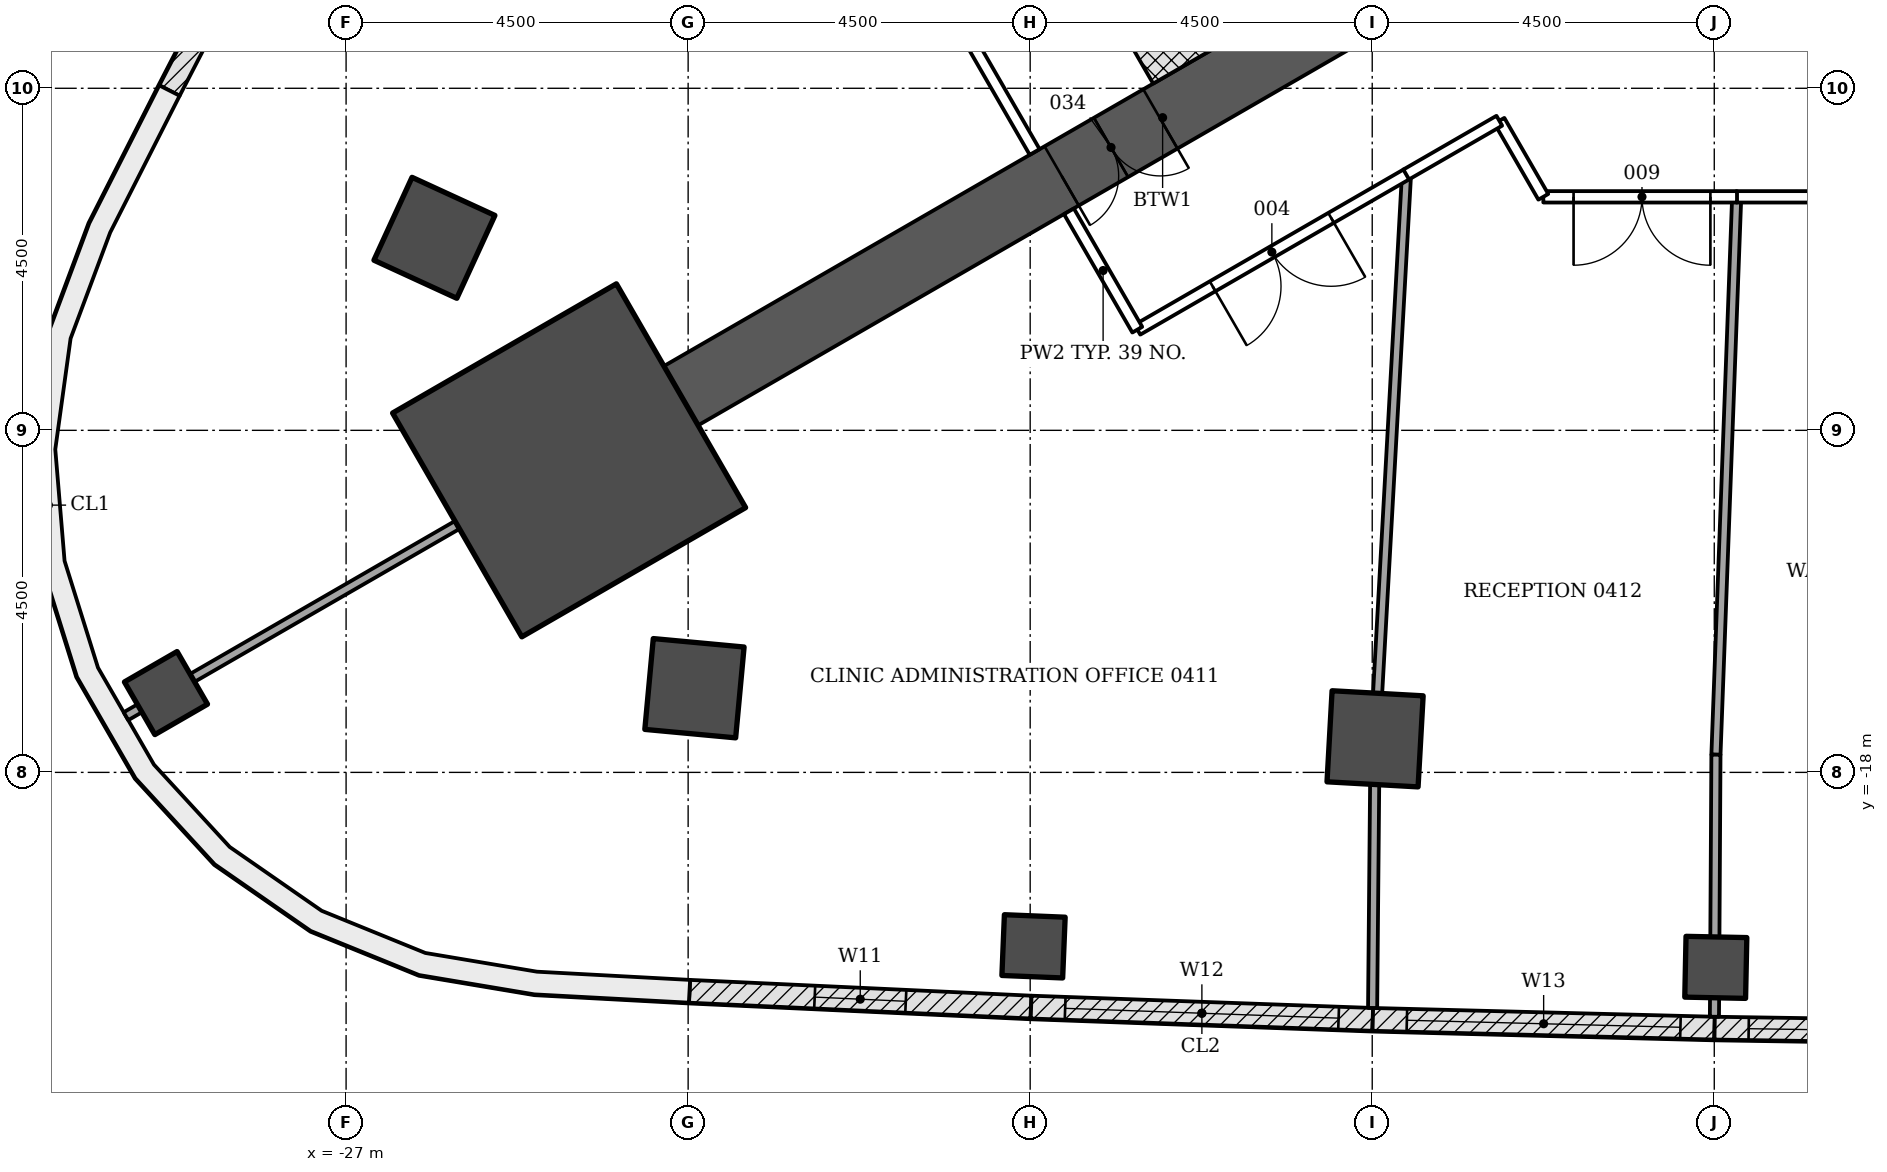
"""IFC4 building model, lengths in metres.
Left out: names, types, materials, properties, quantities, classifications, styles, units other than length and angle.
Written with IfcOpenShell. Run it as: python <this file> out.ifc"""

import sys

from ifc_helpers import new_model, si_unit, direction, frame, frame_2d, origin, origin_2d, place, context, subcontext, project, spatial, polyline, rectangle, outline, extrude, element, fill, save


model = new_model("IFC4")
c1 = context("Model", 3, precision=1e-05, world=origin(), true_north=direction((0.0, 1.0)))
c2 = subcontext(c1, "Body", "Model", "MODEL_VIEW")
j1 = project(units=[si_unit("LENGTHUNIT", "METRE"), si_unit("PLANEANGLEUNIT", "RADIAN")], contexts=[c1])
p1 = place(None, origin())
s1 = spatial("IfcSite", under=j1, at=p1, CompositionType="ELEMENT")
p2 = place(p1, origin())
s2 = spatial("IfcBuilding", under=s1, at=p2, CompositionType="ELEMENT")
p3 = place(p2, frame((0.0, 0.0, 19.5)))
s3 = spatial("IfcBuildingStorey", under=s2, at=p3, CompositionType="ELEMENT", Elevation=19.5)
for number, where, z_axis, x_axis in (
    (1, (-25.838, -10.967, -0.25), (0.0, 0.0, 1.0), (-0.909, 0.418, 0.0)),
    (2, (-22.417, -16.893, -0.25), (0.0, 0.0, 1.0), (-0.093, -0.996, 0.0)),
    (3, (-13.462, -17.558, -0.25), (0.0, 0.0, 1.0), (-0.056, -0.998, 0.0)),
):
    element("IfcColumn", number, at=place(p3, frame(where, z_axis=z_axis, x_axis=x_axis)), inside=s3, PredefinedType="COLUMN", context=c2, shape_type="SweptSolid", body=[
        extrude(rectangle(XDim=1.2, YDim=1.2, at=origin_2d()), origin(), (0.0, 0.0, 1.0), 4.55),
    ])
for number, where, z_axis, x_axis in (
    (4, (-29.37, -16.957, -0.25), (0.0, 0.0, 1.0), (-0.866, -0.5, 0.0)),
    (5, (-17.956, -20.288, -0.25), (0.0, 0.0, 1.0), (-0.041, -0.999, 0.0)),
    (6, (-8.98, -20.565, -0.25), (0.0, 0.0, 1.0), (-0.021, -1.0, 0.0)),
):
    element("IfcColumn", number, at=place(p3, frame(where, z_axis=z_axis, x_axis=x_axis)), inside=s3, PredefinedType="COLUMN", context=c2, shape_type="SweptSolid", body=[
        extrude(rectangle(XDim=0.8, YDim=0.8, at=origin_2d()), origin(), (0.0, 0.0, 1.0), 4.55),
    ])
p4 = place(p3, frame((-9.922, -5.728, -0.25), z_axis=(0.0, 0.0, 1.0), x_axis=(-0.866028046028, -0.499995423472, 0.0)))
e7 = element("IfcWall", 7, at=p4, inside=s3, PredefinedType="SHEAR", context=c2, shape_type="SweptSolid", body=[
    extrude(rectangle(XDim=14.633, YDim=0.9, at=frame_2d((7.316, 0.0))), origin(), (0.0, 0.0, 1.0), 4.55),
])
p5 = place(p4, frame((7.35, 0.0, 0.25)))
e8 = element("IfcOpeningElement", 8, at=p5, cuts=e7, PredefinedType="OPENING", context=c2, shape_type="SweptSolid", body=[
    extrude(rectangle(XDim=1.5, YDim=2.1, at=frame_2d((0.75, 1.05))), frame((0.0, 0.46, 0.0), z_axis=(0.0, -1.0, 0.0), x_axis=(1.0, 0.0, 0.0)), (0.0, 0.0, 1.0), 0.92),
])
p6 = place(p3, frame((-24.066, -13.895, -0.25), z_axis=(0.0, 0.0, 1.0), x_axis=(-0.866025403784, -0.5, 0.0)))
e9 = element("IfcColumn", 9, at=p6, inside=s3, PredefinedType="COLUMN", context=c2, shape_type="SweptSolid", body=[
    extrude(rectangle(XDim=3.4, YDim=3.4, at=origin_2d()), origin(), (0.0, 0.0, 1.0), 4.55),
])
p7 = place(p3, frame((-29.323, -9.029, 0.0), z_axis=(0.0, 0.0, 1.0), x_axis=(0.459443600121, 0.888206945654, 0.0)))
e10 = element("IfcWall", 10, at=p7, inside=s3, PredefinedType="NOTDEFINED", context=c2, shape_type="SweptSolid", body=[
    extrude(rectangle(XDim=4.496, YDim=0.3, at=frame_2d((2.248, 0.0))), origin(), (0.0, 0.0, 1.0), 4.3),
])
p8 = place(p7, frame((1.648, 0.0, 0.8)))
e11 = element("IfcOpeningElement", 11, at=p8, cuts=e10, PredefinedType="OPENING", context=c2, shape_type="SweptSolid", body=[
    extrude(rectangle(XDim=1.2, YDim=3.0, at=frame_2d((0.6, 1.5))), frame((0.0, 0.16, 0.0), z_axis=(0.0, -1.0, 0.0), x_axis=(1.0, 0.0, 0.0)), (0.0, 0.0, 1.0), 0.32),
])
p9 = place(p3, frame((-17.99, -21.088, 0.0), z_axis=(0.0, 0.0, 1.0), x_axis=(-0.998931717866, 0.046210637742, 0.0)))
e12 = element("IfcWall", 12, at=p9, inside=s3, PredefinedType="NOTDEFINED", context=c2, shape_type="SweptSolid", body=[
    extrude(rectangle(XDim=4.496, YDim=0.3, at=frame_2d((2.248, 0.0))), origin(), (0.0, 0.0, 1.0), 4.3),
])
p10 = place(p9, frame((1.648, 0.0, 0.8)))
e13 = element("IfcOpeningElement", 13, at=p10, cuts=e12, PredefinedType="OPENING", context=c2, shape_type="SweptSolid", body=[
    extrude(rectangle(XDim=1.2, YDim=3.0, at=frame_2d((0.6, 1.5))), frame((0.0, 0.16, 0.0), z_axis=(0.0, -1.0, 0.0), x_axis=(1.0, 0.0, 0.0)), (0.0, 0.0, 1.0), 0.32),
])
p11 = place(p3, frame((-13.494, -21.249, 0.0), z_axis=(0.0, 0.0, 1.0), x_axis=(-0.999355640029, 0.035892962294, 0.0)))
e14 = element("IfcWall", 14, at=p11, inside=s3, PredefinedType="NOTDEFINED", context=c2, shape_type="SweptSolid", body=[
    extrude(rectangle(XDim=4.496, YDim=0.3, at=frame_2d((2.248, 0.0))), origin(), (0.0, 0.0, 1.0), 4.3),
])
p12 = place(p11, frame((0.448, 0.0, 1.5)))
e15 = element("IfcOpeningElement", 15, at=p12, cuts=e14, PredefinedType="OPENING", context=c2, shape_type="SweptSolid", body=[
    extrude(rectangle(XDim=3.6, YDim=1.8, at=frame_2d((1.8, 0.9))), frame((0.0, 0.16, 0.0), z_axis=(0.0, -1.0, 0.0), x_axis=(1.0, 0.0, 0.0)), (0.0, 0.0, 1.0), 0.32),
])
p13 = place(p3, frame((-8.998, -21.365, 0.0), z_axis=(0.0, 0.0, 1.0), x_axis=(-0.999671466587, 0.025631209312, 0.0)))
e16 = element("IfcWall", 16, at=p13, inside=s3, PredefinedType="NOTDEFINED", context=c2, shape_type="SweptSolid", body=[
    extrude(rectangle(XDim=4.496, YDim=0.3, at=frame_2d((2.248, 0.0))), origin(), (0.0, 0.0, 1.0), 4.3),
])
p14 = place(p13, frame((0.448, 0.0, 1.5)))
e17 = element("IfcOpeningElement", 17, at=p14, cuts=e16, PredefinedType="OPENING", context=c2, shape_type="SweptSolid", body=[
    extrude(rectangle(XDim=3.6, YDim=1.8, at=frame_2d((1.8, 0.9))), frame((0.0, 0.16, 0.0), z_axis=(0.0, -1.0, 0.0), x_axis=(1.0, 0.0, 0.0)), (0.0, 0.0, 1.0), 0.32),
])
p15 = place(p3, frame((-4.5, -21.434, 0.0), z_axis=(0.0, 0.0, 1.0), x_axis=(-0.999881921814, 0.015366926462, 0.0)))
e18 = element("IfcWall", 18, at=p15, inside=s3, PredefinedType="NOTDEFINED", context=c2, shape_type="SweptSolid", body=[
    extrude(rectangle(XDim=4.496, YDim=0.3, at=frame_2d((2.248, 0.0))), origin(), (0.0, 0.0, 1.0), 4.3),
])
p16 = place(p15, frame((0.448, 0.0, 1.5)))
e19 = element("IfcOpeningElement", 19, at=p16, cuts=e18, PredefinedType="OPENING", context=c2, shape_type="SweptSolid", body=[
    extrude(rectangle(XDim=3.6, YDim=1.8, at=frame_2d((1.8, 0.9))), frame((0.0, 0.16, 0.0), z_axis=(0.0, -1.0, 0.0), x_axis=(1.0, 0.0, 0.0)), (0.0, 0.0, 1.0), 0.32),
])
p17 = place(p3, origin())
e20 = element("IfcWall", 20, at=p17, inside=s3, PredefinedType="NOTDEFINED", context=c2, shape_type="SweptSolid", body=[
    extrude(outline(polyline([(-29.457, -8.962), (-30.379, -10.776), (-30.917, -12.218), (-31.128, -13.742), (-31.0, -15.276), (-30.54, -16.744), (-29.771, -18.077), (-28.729, -19.209), (-27.465, -20.086), (-26.04, -20.666), (-24.522, -20.921), (-22.49, -21.03), (-22.474, -20.73), (-24.489, -20.622), (-25.957, -20.376), (-27.321, -19.821), (-28.531, -18.981), (-29.528, -17.898), (-30.264, -16.623), (-30.704, -15.218), (-30.826, -13.75), (-30.625, -12.292), (-30.104, -10.897), (-29.19, -9.098), (-29.457, -8.962)])), origin(), (0.0, 0.0, 1.0), 4.3),
])
p18 = place(p3, frame((-10.43, -4.847, -0.25), z_axis=(0.0, 0.0, 1.0), x_axis=(-0.866018442252, -0.500012057535, 0.0)))
e21 = element("IfcWall", 21, at=p18, inside=s3, PredefinedType="SHEAR", context=c2, shape_type="SweptSolid", body=[
    extrude(rectangle(XDim=7.2, YDim=1.136, at=frame_2d((3.6, 0.0))), origin(), (0.0, 0.0, 1.0), 4.55),
])
p19 = place(p3, frame((-13.495, -21.099, 0.0), z_axis=(0.0, 0.0, 1.0), x_axis=(0.009216581037, 0.999957526415, 0.0)))
e22 = element("IfcWall", 22, at=p19, inside=s3, PredefinedType="PARTITIONING", context=c2, shape_type="SweptSolid", body=[
    extrude(rectangle(XDim=2.94, YDim=0.12, at=frame_2d((1.47, 0.0))), origin(), (0.0, 0.0, 1.0), 3.683),
])
p20 = place(p3, frame((-13.429, -16.96, 0.0), z_axis=(0.0, 0.0, 1.0), x_axis=(0.055551088657, 0.998455846069, 0.0)))
e23 = element("IfcWall", 23, at=p20, inside=s3, PredefinedType="PARTITIONING", context=c2, shape_type="SweptSolid", body=[
    extrude(rectangle(XDim=6.838, YDim=0.12, at=frame_2d((3.419, 0.0))), origin(), (0.0, 0.0, 1.0), 3.767),
])
p21 = place(p3, frame((-13.045, -10.13, 0.0), z_axis=(0.0, 0.0, 1.0), x_axis=(-0.866035577775, -0.499982377718, 0.0)))
e24 = element("IfcWall", 24, at=p21, inside=s3, PredefinedType="PARTITIONING", context=c2, shape_type="SweptSolid", body=[
    extrude(rectangle(XDim=4.093, YDim=0.15, at=frame_2d((2.046, 0.0))), origin(), (0.0, 0.0, 1.0), 3.767),
])
p22 = place(p21, frame((1.15, 0.0, 0.0)))
e25 = element("IfcOpeningElement", 25, at=p22, cuts=e24, PredefinedType="OPENING", context=c2, shape_type="SweptSolid", body=[
    extrude(rectangle(XDim=1.8, YDim=2.1, at=frame_2d((0.9, 1.05))), frame((0.0, 0.085, 0.0), z_axis=(0.0, -1.0, 0.0), x_axis=(1.0, 0.0, 0.0)), (0.0, 0.0, 1.0), 0.17),
])
p23 = place(p3, frame((-16.591, -12.176, 0.0), z_axis=(0.0, 0.0, 1.0), x_axis=(-0.499965372359, 0.866045395139, 0.0)))
e26 = element("IfcWall", 26, at=p23, inside=s3, PredefinedType="PARTITIONING", context=c2, shape_type="SweptSolid", body=[
    extrude(rectangle(XDim=1.798, YDim=0.15, at=frame_2d((0.899, 0.0))), origin(), (0.0, 0.0, 1.0), 3.843),
])
p24 = place(p3, frame((-29.716, -17.157, 0.0), z_axis=(0.0, 0.0, 1.0), x_axis=(-0.865774595023, -0.500434162116, 0.0)))
e27 = element("IfcWall", 27, at=p24, inside=s3, PredefinedType="PARTITIONING", context=c2, shape_type="SweptSolid", body=[
    extrude(rectangle(XDim=0.208, YDim=0.12, at=frame_2d((0.104, 0.0))), origin(), (0.0, 0.0, 1.0), 4.3),
])
p25 = place(p3, frame((-25.538, -14.745, 0.0), z_axis=(0.0, 0.0, 1.0), x_axis=(-0.866027971625, -0.499995552344, 0.0)))
e28 = element("IfcWall", 28, at=p25, inside=s3, PredefinedType="PARTITIONING", context=c2, shape_type="SweptSolid", body=[
    extrude(rectangle(XDim=4.024, YDim=0.12, at=frame_2d((2.012, 0.0))), origin(), (0.0, 0.0, 1.0), 3.767),
])
p26 = place(p3, frame((-8.996, -20.965, 0.0), z_axis=(0.0, 0.0, 1.0), x_axis=(-0.007812261592, -0.999969483819, 0.0)))
e29 = element("IfcWall", 29, at=p26, inside=s3, PredefinedType="PARTITIONING", context=c2, shape_type="SweptSolid", body=[
    extrude(rectangle(XDim=0.25, YDim=0.12, at=frame_2d((0.125, 0.0))), origin(), (0.0, 0.0, 1.0), 4.3),
])
p27 = place(p3, frame((-8.705, -10.429, 0.0), z_axis=(0.0, 0.0, 1.0), x_axis=(-0.037170289837, -0.999308945999, 0.0)))
e30 = element("IfcWall", 30, at=p27, inside=s3, PredefinedType="PARTITIONING", context=c2, shape_type="SweptSolid", body=[
    extrude(rectangle(XDim=7.343, YDim=0.12, at=frame_2d((3.672, 0.0))), origin(), (0.0, 0.0, 1.0), 3.18),
])
p28 = place(p3, frame((-8.978, -17.767, 0.0), z_axis=(0.0, 0.0, 1.0), x_axis=(-0.005803200997, -0.999983161287, 0.0)))
e31 = element("IfcWall", 31, at=p28, inside=s3, PredefinedType="PARTITIONING", context=c2, shape_type="SweptSolid", body=[
    extrude(rectangle(XDim=2.398, YDim=0.12, at=frame_2d((1.199, 0.0))), origin(), (0.0, 0.0, 1.0), 3.18),
])
p29 = place(p3, frame((-4.347, -10.428, 0.0), z_axis=(0.0, 0.0, 1.0), x_axis=(-1.0, 0.0, 0.0)))
e32 = element("IfcWall", 32, at=p29, inside=s3, PredefinedType="PARTITIONING", context=c2, shape_type="SweptSolid", body=[
    extrude(rectangle(XDim=4.362, YDim=0.15, at=frame_2d((2.181, 0.0))), origin(), (0.0, 0.0, 1.0), 3.698),
])
p30 = place(p29, frame((1.25, 0.0, 0.0)))
e33 = element("IfcOpeningElement", 33, at=p30, cuts=e32, PredefinedType="OPENING", context=c2, shape_type="SweptSolid", body=[
    extrude(rectangle(XDim=1.8, YDim=2.1, at=frame_2d((0.9, 1.05))), frame((0.0, 0.085, 0.0), z_axis=(0.0, -1.0, 0.0), x_axis=(1.0, 0.0, 0.0)), (0.0, 0.0, 1.0), 0.17),
])
p31 = place(p3, frame((-8.701, -10.428, 0.0), z_axis=(0.0, 0.0, 1.0), x_axis=(-1.0, 0.0, 0.0)))
e34 = element("IfcWall", 34, at=p31, inside=s3, PredefinedType="PARTITIONING", context=c2, shape_type="SweptSolid", body=[
    extrude(rectangle(XDim=2.548, YDim=0.15, at=frame_2d((1.274, 0.0))), origin(), (0.0, 0.0, 1.0), 3.698),
])
p32 = place(p31, frame((0.35, 0.0, 0.0)))
e35 = element("IfcOpeningElement", 35, at=p32, cuts=e34, PredefinedType="OPENING", context=c2, shape_type="SweptSolid", body=[
    extrude(rectangle(XDim=1.8, YDim=2.1, at=frame_2d((0.9, 1.05))), frame((0.0, 0.085, 0.0), z_axis=(0.0, -1.0, 0.0), x_axis=(1.0, 0.0, 0.0)), (0.0, 0.0, 1.0), 0.17),
])
p33 = place(p3, frame((-11.249, -10.428, 0.0), z_axis=(0.0, 0.0, 1.0), x_axis=(-0.499978438088, 0.866037852202, 0.0)))
e36 = element("IfcWall", 36, at=p33, inside=s3, PredefinedType="PARTITIONING", context=c2, shape_type="SweptSolid", body=[
    extrude(rectangle(XDim=1.156, YDim=0.15, at=frame_2d((0.578, 0.0))), origin(), (0.0, 0.0, 1.0), 4.3),
])
p34 = place(p3, frame((-11.828, -9.427, 0.0), z_axis=(0.0, 0.0, 1.0), x_axis=(-0.866110865696, -0.499851946404, 0.0)))
e37 = element("IfcWall", 37, at=p34, inside=s3, PredefinedType="PARTITIONING", context=c2, shape_type="SweptSolid", body=[
    extrude(rectangle(XDim=1.415, YDim=0.15, at=frame_2d((0.707, 0.0))), origin(), (0.0, 0.0, 1.0), 3.767),
])
p35 = place(p3, frame((-17.941, -9.838, 0.0), z_axis=(0.0, 0.0, 1.0), x_axis=(-0.500048140185, 0.865997608252, 0.0)))
e38 = element("IfcWall", 38, at=p35, inside=s3, PredefinedType="PARTITIONING", context=c2, shape_type="SweptSolid", body=[
    extrude(rectangle(XDim=6.683, YDim=0.15, at=frame_2d((3.342, 0.0))), origin(), (0.0, 0.0, 1.0), 3.843),
])
p36 = place(p35, frame((2.45, 0.0, 0.0)))
e39 = element("IfcOpeningElement", 39, at=p36, cuts=e38, PredefinedType="OPENING", context=c2, shape_type="SweptSolid", body=[
    extrude(rectangle(XDim=1.8, YDim=2.1, at=frame_2d((0.9, 1.05))), frame((0.0, 0.085, 0.0), z_axis=(0.0, -1.0, 0.0), x_axis=(1.0, 0.0, 0.0)), (0.0, 0.0, 1.0), 0.17),
])
p37 = place(p10, origin())
e40 = element("IfcWindow", 40, at=p37, inside=s3, PartitioningType="SINGLE_PANEL", PredefinedType="WINDOW", context=c2, shape_type="SweptSolid", body=[
    extrude(rectangle(XDim=1.2, YDim=3.0, at=frame_2d((0.6, 1.5))), frame((0.0, 0.03, 0.0), z_axis=(0.0, -1.0, 0.0), x_axis=(1.0, 0.0, 0.0)), (0.0, 0.0, 1.0), 0.06),
])
fill(e13, e40)
p38 = place(p12, origin())
e41 = element("IfcWindow", 41, at=p38, inside=s3, PartitioningType="SINGLE_PANEL", PredefinedType="WINDOW", context=c2, shape_type="SweptSolid", body=[
    extrude(rectangle(XDim=3.6, YDim=1.8, at=frame_2d((1.8, 0.9))), frame((0.0, 0.03, 0.0), z_axis=(0.0, -1.0, 0.0), x_axis=(1.0, 0.0, 0.0)), (0.0, 0.0, 1.0), 0.06),
])
fill(e15, e41)
p39 = place(p14, origin())
e42 = element("IfcWindow", 42, at=p39, inside=s3, PartitioningType="SINGLE_PANEL", PredefinedType="WINDOW", context=c2, shape_type="SweptSolid", body=[
    extrude(rectangle(XDim=3.6, YDim=1.8, at=frame_2d((1.8, 0.9))), frame((0.0, 0.03, 0.0), z_axis=(0.0, -1.0, 0.0), x_axis=(1.0, 0.0, 0.0)), (0.0, 0.0, 1.0), 0.06),
])
fill(e17, e42)
p40 = place(p16, origin())
e43 = element("IfcWindow", 43, at=p40, inside=s3, PartitioningType="SINGLE_PANEL", PredefinedType="WINDOW", context=c2, shape_type="SweptSolid", body=[
    extrude(rectangle(XDim=3.6, YDim=1.8, at=frame_2d((1.8, 0.9))), frame((0.0, 0.03, 0.0), z_axis=(0.0, -1.0, 0.0), x_axis=(1.0, 0.0, 0.0)), (0.0, 0.0, 1.0), 0.06),
])
fill(e19, e43)
p41 = place(p22, origin())
e44 = element("IfcDoor", 44, at=p41, inside=s3, OperationType="DOUBLE_DOOR_SINGLE_SWING", PredefinedType="DOOR", context=c2, shape_type="SweptSolid", body=[
    extrude(rectangle(XDim=1.8, YDim=2.1, at=frame_2d((0.9, 1.05))), frame((0.0, 0.025, 0.0), z_axis=(0.0, -1.0, 0.0), x_axis=(1.0, 0.0, 0.0)), (0.0, 0.0, 1.0), 0.05),
])
fill(e25, e44)
p42 = place(p32, origin())
e45 = element("IfcDoor", 45, at=p42, inside=s3, OperationType="DOUBLE_DOOR_SINGLE_SWING", PredefinedType="DOOR", context=c2, shape_type="SweptSolid", body=[
    extrude(rectangle(XDim=1.8, YDim=2.1, at=frame_2d((0.9, 1.05))), frame((0.0, 0.025, 0.0), z_axis=(0.0, -1.0, 0.0), x_axis=(1.0, 0.0, 0.0)), (0.0, 0.0, 1.0), 0.05),
])
fill(e35, e45)
p43 = place(p5, origin())
e46 = element("IfcDoor", 46, at=p43, inside=s3, OperationType="DOUBLE_DOOR_SINGLE_SWING", PredefinedType="DOOR", context=c2, shape_type="SweptSolid", body=[
    extrude(rectangle(XDim=1.5, YDim=2.1, at=frame_2d((0.75, 1.05))), frame((0.0, 0.025, 0.0), z_axis=(0.0, -1.0, 0.0), x_axis=(1.0, 0.0, 0.0)), (0.0, 0.0, 1.0), 0.05),
])
fill(e8, e46)
save(model, sys.argv[1])
